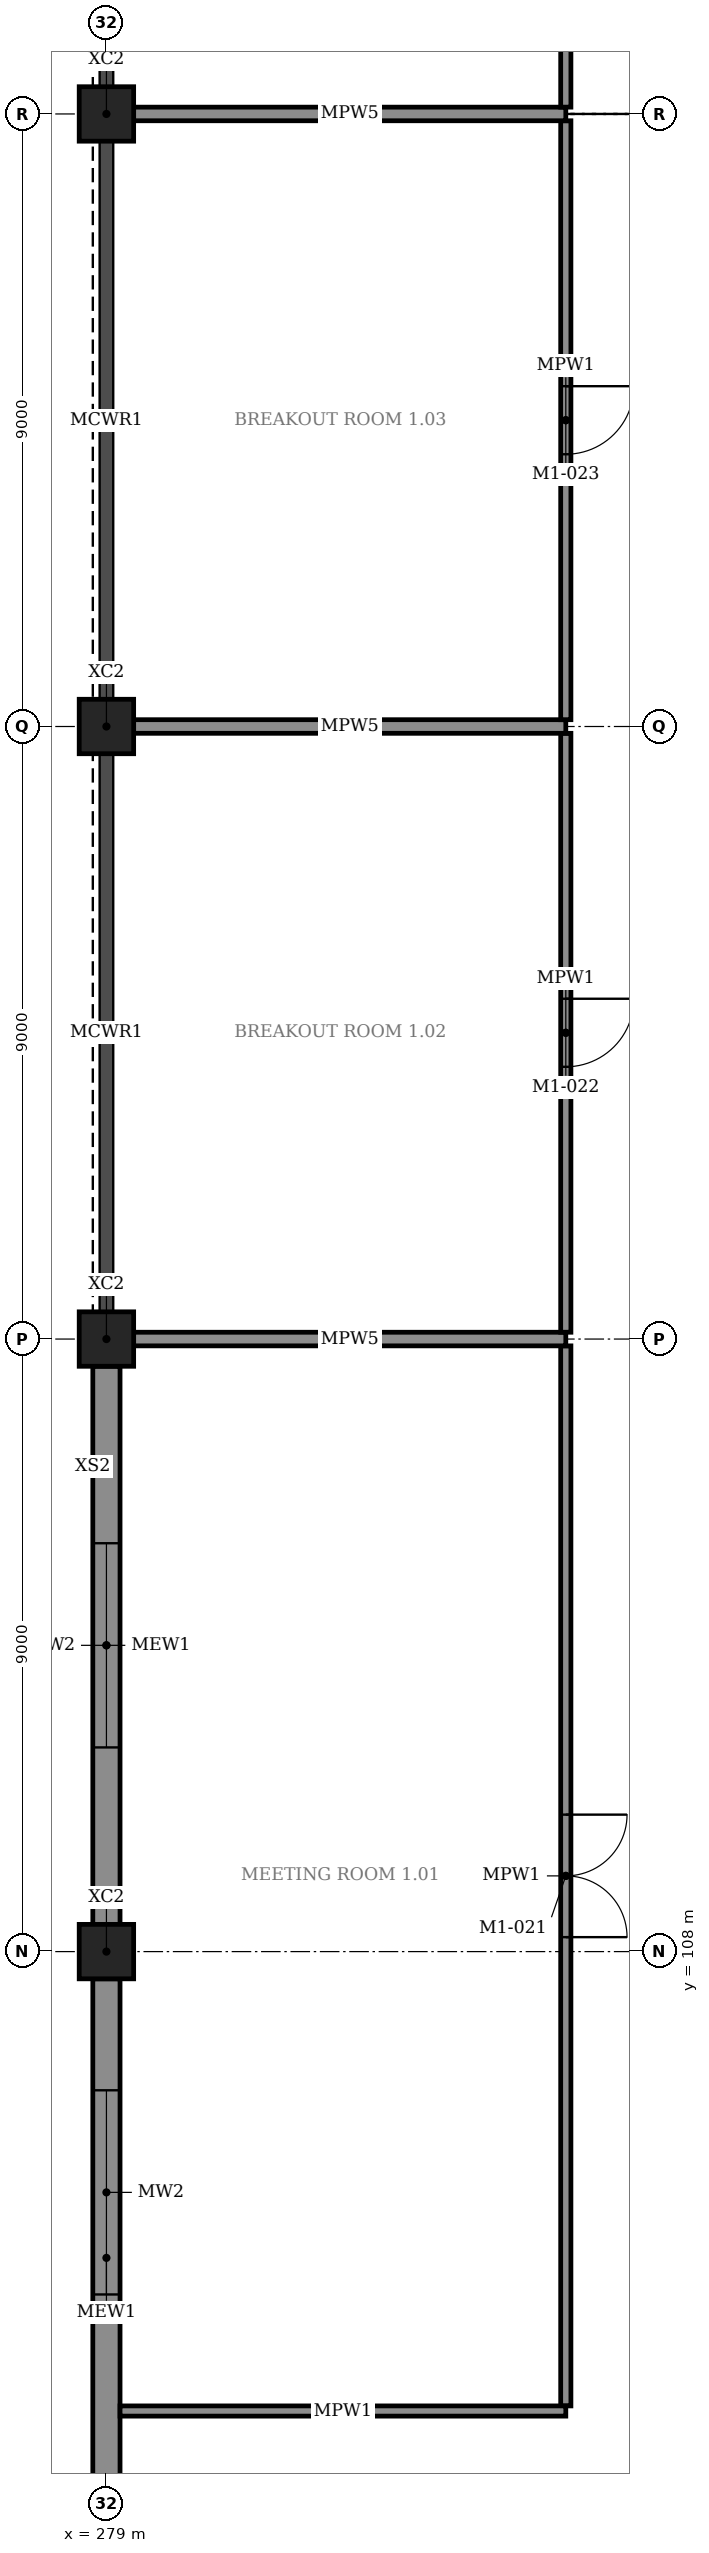
"""IFC4 building model, lengths in metres.
Left out: names, types, materials, properties, quantities, classifications, styles, units other than length and angle.
Written with IfcOpenShell. Run it as: python <this file> out.ifc"""

import sys

from ifc_helpers import new_model, si_unit, direction, frame, frame_2d, origin, origin_2d, place, context, subcontext, project, spatial, rectangle, extrude, element, fill, save


model = new_model("IFC4")
c1 = context("Model", 3, precision=1e-05, world=origin(), true_north=direction((0.0, 1.0)))
c2 = subcontext(c1, "Body", "Model", "MODEL_VIEW")
j1 = project(units=[si_unit("LENGTHUNIT", "METRE"), si_unit("PLANEANGLEUNIT", "RADIAN")], contexts=[c1])
p1 = place(None, origin())
s1 = spatial("IfcSite", under=j1, at=p1, CompositionType="ELEMENT")
p2 = place(p1, origin())
s2 = spatial("IfcBuilding", under=s1, at=p2, CompositionType="ELEMENT")
p3 = place(p2, frame((0.0, 0.0, 6.0)))
s3 = spatial("IfcBuildingStorey", under=s2, at=p3, CompositionType="ELEMENT", Elevation=6.0)
for number, where, z_axis, x_axis in (
    (1, (279.0, 108.0, 0.0), (0.0, 0.0, 1.0), (1.0, 0.0, 0.0)),
    (2, (279.0, 117.0, 0.0), (0.0, 0.0, 1.0), (1.0, 0.0, 0.0)),
    (3, (279.0, 126.0, 0.0), (0.0, 0.0, 1.0), (1.0, 0.0, 0.0)),
    (4, (279.0, 135.0, 0.0), (0.0, 0.0, 1.0), (1.0, 0.0, 0.0)),
):
    element("IfcColumn", number, at=place(p3, frame(where, z_axis=z_axis, x_axis=x_axis)), inside=s3, PredefinedType="COLUMN", context=c2, shape_type="SweptSolid", body=[
        extrude(rectangle(XDim=0.8, YDim=0.8, at=origin_2d()), origin(), (0.0, 0.0, 1.0), 5.5),
    ])
p4 = place(p3, frame((279.0, 99.4, 0.0), z_axis=(0.0, 0.0, 1.0), x_axis=(0.0, 1.0, 0.0)))
e5 = element("IfcWall", 5, at=p4, inside=s3, PredefinedType="STANDARD", context=c2, shape_type="SweptSolid", body=[
    extrude(rectangle(XDim=8.2, YDim=0.4, at=frame_2d((4.1, 0.0))), origin(), (0.0, 0.0, 1.0), 4.32),
])
p5 = place(p4, frame((3.562, 0.0, 0.9)))
e6 = element("IfcOpeningElement", 6, at=p5, cuts=e5, PredefinedType="OPENING", context=c2, shape_type="SweptSolid", body=[
    extrude(rectangle(XDim=3.0, YDim=2.1, at=frame_2d((1.5, 1.05))), frame((0.0, 0.21, 0.0), z_axis=(0.0, -1.0, 0.0), x_axis=(1.0, 0.0, 0.0)), (0.0, 0.0, 1.0), 0.42),
])
p6 = place(p3, frame((279.0, 108.4, 0.0), z_axis=(0.0, 0.0, 1.0), x_axis=(0.0, 1.0, 0.0)))
e7 = element("IfcWall", 7, at=p6, inside=s3, PredefinedType="STANDARD", context=c2, shape_type="SweptSolid", body=[
    extrude(rectangle(XDim=8.2, YDim=0.4, at=frame_2d((4.1, 0.0))), origin(), (0.0, 0.0, 1.0), 4.32),
])
p7 = place(p6, frame((2.6, 0.0, 0.9)))
e8 = element("IfcOpeningElement", 8, at=p7, cuts=e7, PredefinedType="OPENING", context=c2, shape_type="SweptSolid", body=[
    extrude(rectangle(XDim=3.0, YDim=2.1, at=frame_2d((1.5, 1.05))), frame((0.0, 0.21, 0.0), z_axis=(0.0, -1.0, 0.0), x_axis=(1.0, 0.0, 0.0)), (0.0, 0.0, 1.0), 0.42),
])
p8 = place(p3, frame((279.2, 101.25, 0.0), z_axis=(0.0, 0.0, 1.0), x_axis=(1.0, 0.0, 0.0)))
e9 = element("IfcWall", 9, at=p8, inside=s3, PredefinedType="PARTITIONING", context=c2, shape_type="SweptSolid", body=[
    extrude(rectangle(XDim=6.55, YDim=0.15, at=frame_2d((3.275, 0.0))), origin(), (0.0, 0.0, 1.0), 4.32),
])
p9 = place(p3, frame((279.4, 117.0, 0.0), z_axis=(0.0, 0.0, 1.0), x_axis=(1.0, 0.0, 0.0)))
e10 = element("IfcWall", 10, at=p9, inside=s3, PredefinedType="PARTITIONING", context=c2, shape_type="SweptSolid", body=[
    extrude(rectangle(XDim=6.35, YDim=0.2, at=frame_2d((3.175, 0.0))), origin(), (0.0, 0.0, 1.0), 4.32),
])
p10 = place(p3, frame((285.75, 101.325, 0.0), z_axis=(0.0, 0.0, 1.0), x_axis=(0.0, 1.0, 0.0)))
e11 = element("IfcWall", 11, at=p10, inside=s3, PredefinedType="PARTITIONING", context=c2, shape_type="SweptSolid", body=[
    extrude(rectangle(XDim=15.575, YDim=0.15, at=frame_2d((7.788, 0.0))), origin(), (0.0, 0.0, 1.0), 4.32),
])
p11 = place(p10, frame((6.887, 0.0, 0.0)))
e12 = element("IfcOpeningElement", 12, at=p11, cuts=e11, PredefinedType="OPENING", context=c2, shape_type="SweptSolid", body=[
    extrude(rectangle(XDim=1.8, YDim=2.4, at=frame_2d((0.9, 1.2))), frame((0.0, 0.085, 0.0), z_axis=(0.0, -1.0, 0.0), x_axis=(1.0, 0.0, 0.0)), (0.0, 0.0, 1.0), 0.17),
])
p12 = place(p3, frame((279.4, 126.0, 0.0), z_axis=(0.0, 0.0, 1.0), x_axis=(1.0, 0.0, 0.0)))
e13 = element("IfcWall", 13, at=p12, inside=s3, PredefinedType="PARTITIONING", context=c2, shape_type="SweptSolid", body=[
    extrude(rectangle(XDim=6.35, YDim=0.2, at=frame_2d((3.175, 0.0))), origin(), (0.0, 0.0, 1.0), 4.32),
])
p13 = place(p3, frame((285.75, 117.1, 0.0), z_axis=(0.0, 0.0, 1.0), x_axis=(0.0, 1.0, 0.0)))
e14 = element("IfcWall", 14, at=p13, inside=s3, PredefinedType="PARTITIONING", context=c2, shape_type="SweptSolid", body=[
    extrude(rectangle(XDim=8.8, YDim=0.15, at=frame_2d((4.4, 0.0))), origin(), (0.0, 0.0, 1.0), 4.32),
])
p14 = place(p13, frame((3.9, 0.0, 0.0)))
e15 = element("IfcOpeningElement", 15, at=p14, cuts=e14, PredefinedType="OPENING", context=c2, shape_type="SweptSolid", body=[
    extrude(rectangle(XDim=1.0, YDim=2.4, at=frame_2d((0.5, 1.2))), frame((0.0, 0.085, 0.0), z_axis=(0.0, -1.0, 0.0), x_axis=(1.0, 0.0, 0.0)), (0.0, 0.0, 1.0), 0.17),
])
p15 = place(p3, frame((279.4, 135.0, 0.0), z_axis=(0.0, 0.0, 1.0), x_axis=(1.0, 0.0, 0.0)))
e16 = element("IfcWall", 16, at=p15, inside=s3, PredefinedType="PARTITIONING", context=c2, shape_type="SweptSolid", body=[
    extrude(rectangle(XDim=6.35, YDim=0.2, at=frame_2d((3.175, 0.0))), origin(), (0.0, 0.0, 1.0), 4.32),
])
p16 = place(p3, frame((285.75, 126.1, 0.0), z_axis=(0.0, 0.0, 1.0), x_axis=(0.0, 1.0, 0.0)))
e17 = element("IfcWall", 17, at=p16, inside=s3, PredefinedType="PARTITIONING", context=c2, shape_type="SweptSolid", body=[
    extrude(rectangle(XDim=8.8, YDim=0.15, at=frame_2d((4.4, 0.0))), origin(), (0.0, 0.0, 1.0), 4.32),
])
p17 = place(p16, frame((3.9, 0.0, 0.0)))
e18 = element("IfcOpeningElement", 18, at=p17, cuts=e17, PredefinedType="OPENING", context=c2, shape_type="SweptSolid", body=[
    extrude(rectangle(XDim=1.0, YDim=2.4, at=frame_2d((0.5, 1.2))), frame((0.0, 0.085, 0.0), z_axis=(0.0, -1.0, 0.0), x_axis=(1.0, 0.0, 0.0)), (0.0, 0.0, 1.0), 0.17),
])
p18 = place(p3, frame((285.75, 135.1, 0.0), z_axis=(0.0, 0.0, 1.0), x_axis=(0.0, 1.0, 0.0)))
e19 = element("IfcWall", 19, at=p18, inside=s3, PredefinedType="PARTITIONING", context=c2, shape_type="SweptSolid", body=[
    extrude(rectangle(XDim=17.8, YDim=0.15, at=frame_2d((8.9, 0.0))), origin(), (0.0, 0.0, 1.0), 4.32),
])
p19 = place(p18, frame((8.0, 0.0, 0.0)))
e20 = element("IfcOpeningElement", 20, at=p19, cuts=e19, PredefinedType="OPENING", context=c2, shape_type="SweptSolid", body=[
    extrude(rectangle(XDim=1.8, YDim=2.4, at=frame_2d((0.9, 1.2))), frame((0.0, 0.085, 0.0), z_axis=(0.0, -1.0, 0.0), x_axis=(1.0, 0.0, 0.0)), (0.0, 0.0, 1.0), 0.17),
])
p20 = place(p5, origin())
e21 = element("IfcWindow", 21, at=p20, inside=s3, PartitioningType="TRIPLE_PANEL_VERTICAL", PredefinedType="WINDOW", context=c2, shape_type="SweptSolid", body=[
    extrude(rectangle(XDim=3.0, YDim=2.1, at=frame_2d((1.5, 1.05))), frame((0.0, 0.03, 0.0), z_axis=(0.0, -1.0, 0.0), x_axis=(1.0, 0.0, 0.0)), (0.0, 0.0, 1.0), 0.06),
])
fill(e6, e21)
p21 = place(p7, origin())
e22 = element("IfcWindow", 22, at=p21, inside=s3, PartitioningType="TRIPLE_PANEL_VERTICAL", PredefinedType="WINDOW", context=c2, shape_type="SweptSolid", body=[
    extrude(rectangle(XDim=3.0, YDim=2.1, at=frame_2d((1.5, 1.05))), frame((0.0, 0.03, 0.0), z_axis=(0.0, -1.0, 0.0), x_axis=(1.0, 0.0, 0.0)), (0.0, 0.0, 1.0), 0.06),
])
fill(e8, e22)
p22 = place(p11, frame((1.8, 0.0, 0.0), z_axis=(0.0, 0.0, 1.0), x_axis=(-1.0, 0.0, 0.0)))
e23 = element("IfcDoor", 23, at=p22, inside=s3, OperationType="DOUBLE_DOOR_SINGLE_SWING", PredefinedType="DOOR", context=c2, shape_type="SweptSolid", body=[
    extrude(rectangle(XDim=1.8, YDim=2.4, at=frame_2d((0.9, 1.2))), frame((0.0, 0.025, 0.0), z_axis=(0.0, -1.0, 0.0), x_axis=(1.0, 0.0, 0.0)), (0.0, 0.0, 1.0), 0.05),
])
fill(e12, e23)
p23 = place(p14, frame((1.0, 0.0, 0.0), z_axis=(0.0, 0.0, 1.0), x_axis=(-1.0, 0.0, 0.0)))
e24 = element("IfcDoor", 24, at=p23, inside=s3, OperationType="SINGLE_SWING_RIGHT", PredefinedType="DOOR", context=c2, shape_type="SweptSolid", body=[
    extrude(rectangle(XDim=1.0, YDim=2.4, at=frame_2d((0.5, 1.2))), frame((0.0, 0.025, 0.0), z_axis=(0.0, -1.0, 0.0), x_axis=(1.0, 0.0, 0.0)), (0.0, 0.0, 1.0), 0.05),
])
fill(e15, e24)
p24 = place(p17, frame((1.0, 0.0, 0.0), z_axis=(0.0, 0.0, 1.0), x_axis=(-1.0, 0.0, 0.0)))
e25 = element("IfcDoor", 25, at=p24, inside=s3, OperationType="SINGLE_SWING_RIGHT", PredefinedType="DOOR", context=c2, shape_type="SweptSolid", body=[
    extrude(rectangle(XDim=1.0, YDim=2.4, at=frame_2d((0.5, 1.2))), frame((0.0, 0.025, 0.0), z_axis=(0.0, -1.0, 0.0), x_axis=(1.0, 0.0, 0.0)), (0.0, 0.0, 1.0), 0.05),
])
fill(e18, e25)
save(model, sys.argv[1])
